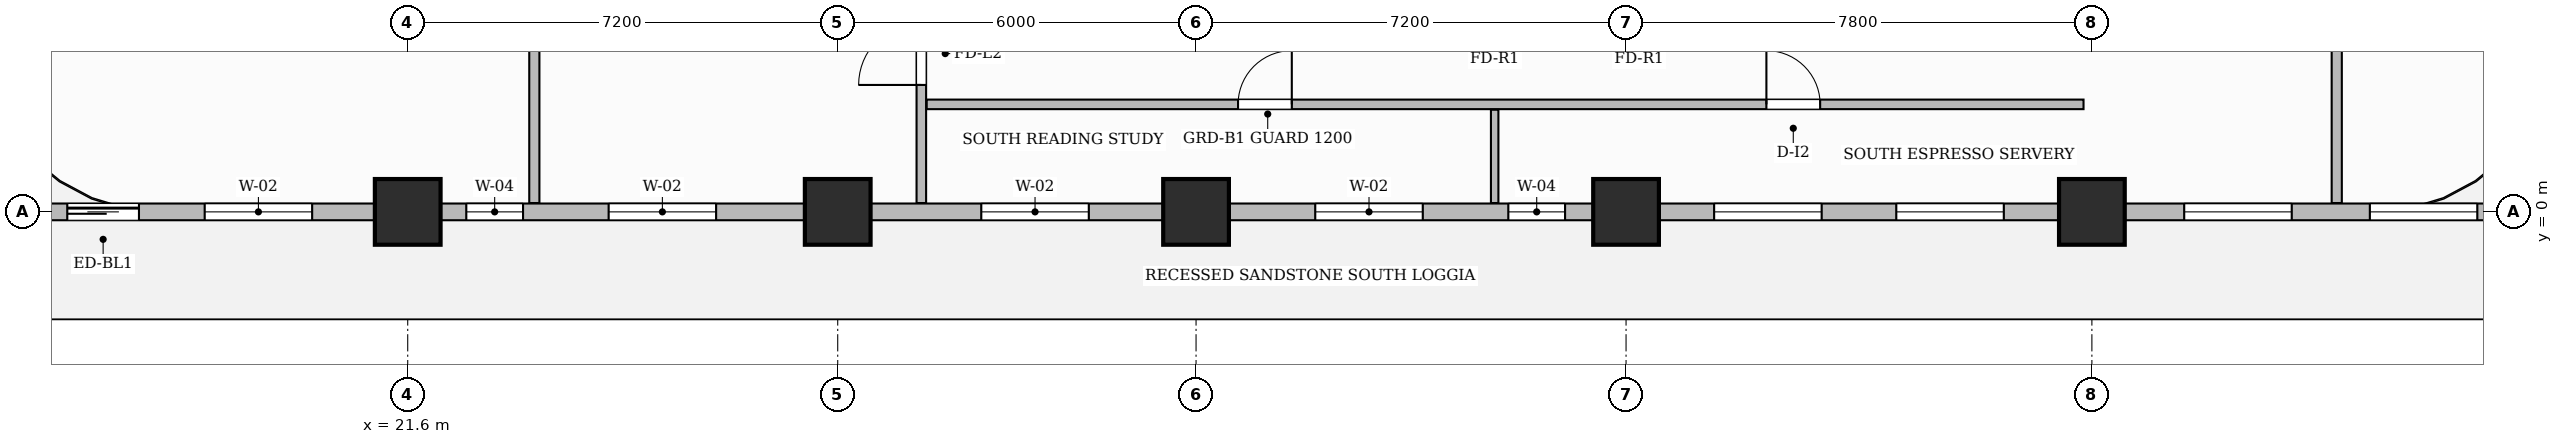
"""IFC4 building model, lengths in metres.
Left out: names, types, materials, properties, quantities, classifications, styles, units other than length and angle.
Written with IfcOpenShell. Run it as: python <this file> out.ifc"""

import sys

from ifc_helpers import new_model, si_unit, direction, frame, frame_2d, origin, origin_2d, place, context, subcontext, project, spatial, rectangle, extrude, source, transform, mapped, element, fill, save


model = new_model("IFC4")
c1 = context("Model", 3, precision=1e-05, world=origin(), true_north=direction((0.0, 1.0)))
c2 = subcontext(c1, "Body", "Model", "MODEL_VIEW")
j1 = project(units=[si_unit("LENGTHUNIT", "METRE"), si_unit("PLANEANGLEUNIT", "RADIAN")], contexts=[c1])
p1 = place(None, origin())
s1 = spatial("IfcSite", under=j1, at=p1, CompositionType="ELEMENT")
p2 = place(p1, origin())
s2 = spatial("IfcBuilding", under=s1, at=p2, CompositionType="ELEMENT")
p3 = place(p2, frame((0.0, 0.0, 43.5)))
s3 = spatial("IfcBuildingStorey", under=s2, at=p3, CompositionType="ELEMENT", Elevation=43.5)
m1 = source(origin(), c2, "Body", "SweptSolid", [
    extrude(rectangle(XDim=1.1, YDim=1.1, at=origin_2d()), origin(), (0.0, 0.0, 1.0), 3.7),
])
for number, where, z_axis, x_axis in (
    (1, (21.6, 0.0, 0.0), (0.0, 0.0, 1.0), (1.0, 0.0, 0.0)),
    (2, (28.8, 0.0, 0.0), (0.0, 0.0, 1.0), (1.0, 0.0, 0.0)),
    (3, (34.8, 0.0, 0.0), (0.0, 0.0, 1.0), (1.0, 0.0, 0.0)),
    (4, (42.0, 0.0, 0.0), (0.0, 0.0, 1.0), (1.0, 0.0, 0.0)),
    (5, (49.8, 0.0, 0.0), (0.0, 0.0, 1.0), (1.0, 0.0, 0.0)),
):
    element("IfcColumn", number, at=place(p3, frame(where, z_axis=z_axis, x_axis=x_axis)), inside=s3, PredefinedType="COLUMN", context=c2, shape_type="MappedRepresentation", body=[
        mapped(m1, transform((0.0, 0.0, 0.0), scale=1.0)),
    ])
p4 = place(p3, frame((30.2, 0.148, 0.0), z_axis=(0.0, 0.0, 1.0), x_axis=(0.0, 1.0, 0.0)))
e6 = element("IfcWall", 6, at=p4, inside=s3, PredefinedType="PARTITIONING", context=c2, shape_type="SweptSolid", body=[
    extrude(rectangle(XDim=9.512, YDim=0.16, at=frame_2d((4.756, 0.0))), origin(), (0.0, 0.0, 1.0), 3.45),
])
p5 = place(p4, frame((1.977, 0.0, 0.0)))
e7 = element("IfcOpeningElement", 7, at=p5, cuts=e6, PredefinedType="OPENING", context=c2, shape_type="SweptSolid", body=[
    extrude(rectangle(XDim=1.05, YDim=2.15, at=frame_2d((0.525, 1.075))), frame((0.0, 0.09, 0.0), z_axis=(0.0, -1.0, 0.0), x_axis=(1.0, 0.0, 0.0)), (0.0, 0.0, 1.0), 0.18),
])
p6 = place(p3, frame((30.29, 1.8, 0.0), z_axis=(0.0, 0.0, 1.0), x_axis=(1.0, 0.0, 0.0)))
e8 = element("IfcWall", 8, at=p6, inside=s3, PredefinedType="PARTITIONING", context=c2, shape_type="SweptSolid", body=[
    extrude(rectangle(XDim=19.37, YDim=0.16, at=frame_2d((9.685, 0.0))), origin(), (0.0, 0.0, 1.0), 3.45),
])
p7 = place(p6, frame((5.213, 0.0, 0.0)))
e9 = element("IfcOpeningElement", 9, at=p7, cuts=e8, PredefinedType="OPENING", context=c2, shape_type="SweptSolid", body=[
    extrude(rectangle(XDim=0.9, YDim=2.15, at=frame_2d((0.45, 1.075))), frame((0.0, 0.09, 0.0), z_axis=(0.0, -1.0, 0.0), x_axis=(1.0, 0.0, 0.0)), (0.0, 0.0, 1.0), 0.18),
])
p8 = place(p6, frame((14.06, 0.0, 0.0)))
e10 = element("IfcOpeningElement", 10, at=p8, cuts=e8, PredefinedType="OPENING", context=c2, shape_type="SweptSolid", body=[
    extrude(rectangle(XDim=0.9, YDim=2.15, at=frame_2d((0.45, 1.075))), frame((0.0, 0.09, 0.0), z_axis=(0.0, -1.0, 0.0), x_axis=(1.0, 0.0, 0.0)), (0.0, 0.0, 1.0), 0.18),
])
p9 = place(p3, frame((39.8, 0.148, 0.0), z_axis=(0.0, 0.0, 1.0), x_axis=(0.0, 1.0, 0.0)))
e11 = element("IfcWall", 11, at=p9, inside=s3, PredefinedType="PARTITIONING", context=c2, shape_type="SweptSolid", body=[
    extrude(rectangle(XDim=1.562, YDim=0.125, at=frame_2d((0.781, 0.0))), origin(), (0.0, 0.0, 1.0), 3.45),
])
p10 = place(p3, frame((53.9, 0.148, 0.0), z_axis=(0.0, 0.0, 1.0), x_axis=(0.0, 1.0, 0.0)))
e12 = element("IfcWall", 12, at=p10, inside=s3, PredefinedType="PARTITIONING", context=c2, shape_type="SweptSolid", body=[
    extrude(rectangle(XDim=14.162, YDim=0.17, at=frame_2d((7.081, 0.0))), origin(), (0.0, 0.0, 1.0), 3.035),
])
p11 = place(p3, frame((23.72, 0.148, 0.0), z_axis=(0.0, 0.0, 1.0), x_axis=(0.0, 1.0, 0.0)))
e13 = element("IfcWall", 13, at=p11, inside=s3, PredefinedType="PARTITIONING", context=c2, shape_type="SweptSolid", body=[
    extrude(rectangle(XDim=9.512, YDim=0.17, at=frame_2d((4.756, 0.0))), origin(), (0.0, 0.0, 1.0), 3.45),
])
p12 = place(p3, frame((14.4, 0.0, 0.0), z_axis=(0.0, 0.0, 1.0), x_axis=(1.0, 0.0, 0.0)))
e14 = element("IfcWall", 14, at=p12, inside=s3, PredefinedType="SOLIDWALL", context=c2, shape_type="SweptSolid", body=[
    extrude(rectangle(XDim=43.2, YDim=0.28, at=frame_2d((21.6, 0.0))), origin(), (0.0, 0.0, 1.0), 2.885),
])
p13 = place(p12, frame((1.5, 0.0, 0.0)))
e15 = element("IfcOpeningElement", 15, at=p13, cuts=e14, PredefinedType="OPENING", context=c2, shape_type="SweptSolid", body=[
    extrude(rectangle(XDim=1.2, YDim=2.2, at=frame_2d((0.6, 1.1))), frame((0.0, 0.15, 0.0), z_axis=(0.0, -1.0, 0.0), x_axis=(1.0, 0.0, 0.0)), (0.0, 0.0, 1.0), 0.3),
])
p14 = place(p12, frame((3.8, 0.0, 0.8)))
e16 = element("IfcOpeningElement", 16, at=p14, cuts=e14, PredefinedType="OPENING", context=c2, shape_type="SweptSolid", body=[
    extrude(rectangle(XDim=1.8, YDim=1.85, at=frame_2d((0.9, 0.925))), frame((0.0, 0.15, 0.0), z_axis=(0.0, -1.0, 0.0), x_axis=(1.0, 0.0, 0.0)), (0.0, 0.0, 1.0), 0.3),
])
p15 = place(p12, frame((8.181, 0.0, 0.8)))
e17 = element("IfcOpeningElement", 17, at=p15, cuts=e14, PredefinedType="OPENING", context=c2, shape_type="SweptSolid", body=[
    extrude(rectangle(XDim=0.95, YDim=1.75, at=frame_2d((0.475, 0.875))), frame((0.0, 0.15, 0.0), z_axis=(0.0, -1.0, 0.0), x_axis=(1.0, 0.0, 0.0)), (0.0, 0.0, 1.0), 0.3),
])
p16 = place(p12, frame((10.564, 0.0, 0.8)))
e18 = element("IfcOpeningElement", 18, at=p16, cuts=e14, PredefinedType="OPENING", context=c2, shape_type="SweptSolid", body=[
    extrude(rectangle(XDim=1.8, YDim=1.85, at=frame_2d((0.9, 0.925))), frame((0.0, 0.15, 0.0), z_axis=(0.0, -1.0, 0.0), x_axis=(1.0, 0.0, 0.0)), (0.0, 0.0, 1.0), 0.3),
])
p17 = place(p12, frame((16.804, 0.0, 0.8)))
e19 = element("IfcOpeningElement", 19, at=p17, cuts=e14, PredefinedType="OPENING", context=c2, shape_type="SweptSolid", body=[
    extrude(rectangle(XDim=1.8, YDim=1.85, at=frame_2d((0.9, 0.925))), frame((0.0, 0.15, 0.0), z_axis=(0.0, -1.0, 0.0), x_axis=(1.0, 0.0, 0.0)), (0.0, 0.0, 1.0), 0.3),
])
p18 = place(p12, frame((22.396, 0.0, 0.8)))
e20 = element("IfcOpeningElement", 20, at=p18, cuts=e14, PredefinedType="OPENING", context=c2, shape_type="SweptSolid", body=[
    extrude(rectangle(XDim=1.8, YDim=1.85, at=frame_2d((0.9, 0.925))), frame((0.0, 0.15, 0.0), z_axis=(0.0, -1.0, 0.0), x_axis=(1.0, 0.0, 0.0)), (0.0, 0.0, 1.0), 0.3),
])
p19 = place(p12, frame((25.629, 0.0, 0.8)))
e21 = element("IfcOpeningElement", 21, at=p19, cuts=e14, PredefinedType="OPENING", context=c2, shape_type="SweptSolid", body=[
    extrude(rectangle(XDim=0.95, YDim=1.75, at=frame_2d((0.475, 0.875))), frame((0.0, 0.15, 0.0), z_axis=(0.0, -1.0, 0.0), x_axis=(1.0, 0.0, 0.0)), (0.0, 0.0, 1.0), 0.3),
])
p20 = place(p12, frame((29.075, 0.0, 0.8)))
e22 = element("IfcOpeningElement", 22, at=p20, cuts=e14, PredefinedType="OPENING", context=c2, shape_type="SweptSolid", body=[
    extrude(rectangle(XDim=1.8, YDim=1.85, at=frame_2d((0.9, 0.925))), frame((0.0, 0.15, 0.0), z_axis=(0.0, -1.0, 0.0), x_axis=(1.0, 0.0, 0.0)), (0.0, 0.0, 1.0), 0.3),
])
p21 = place(p12, frame((32.125, 0.0, 0.8)))
e23 = element("IfcOpeningElement", 23, at=p21, cuts=e14, PredefinedType="OPENING", context=c2, shape_type="SweptSolid", body=[
    extrude(rectangle(XDim=1.8, YDim=1.85, at=frame_2d((0.9, 0.925))), frame((0.0, 0.15, 0.0), z_axis=(0.0, -1.0, 0.0), x_axis=(1.0, 0.0, 0.0)), (0.0, 0.0, 1.0), 0.3),
])
p22 = place(p12, frame((36.946, 0.0, 0.8)))
e24 = element("IfcOpeningElement", 24, at=p22, cuts=e14, PredefinedType="OPENING", context=c2, shape_type="SweptSolid", body=[
    extrude(rectangle(XDim=1.8, YDim=1.85, at=frame_2d((0.9, 0.925))), frame((0.0, 0.15, 0.0), z_axis=(0.0, -1.0, 0.0), x_axis=(1.0, 0.0, 0.0)), (0.0, 0.0, 1.0), 0.3),
])
p23 = place(p12, frame((40.054, 0.0, 0.8)))
e25 = element("IfcOpeningElement", 25, at=p23, cuts=e14, PredefinedType="OPENING", context=c2, shape_type="SweptSolid", body=[
    extrude(rectangle(XDim=1.8, YDim=1.85, at=frame_2d((0.9, 0.925))), frame((0.0, 0.15, 0.0), z_axis=(0.0, -1.0, 0.0), x_axis=(1.0, 0.0, 0.0)), (0.0, 0.0, 1.0), 0.3),
])
m2 = source(origin(), c2, "Body", "SweptSolid", [
    extrude(rectangle(XDim=1.05, YDim=2.15, at=frame_2d((0.525, 1.075))), frame((0.0, 0.025, 0.0), z_axis=(0.0, -1.0, 0.0), x_axis=(1.0, 0.0, 0.0)), (0.0, 0.0, 1.0), 0.05),
])
p24 = place(p5, origin())
e26 = element("IfcDoor", 26, at=p24, inside=s3, OperationType="SINGLE_SWING_LEFT", PredefinedType="DOOR", context=c2, shape_type="MappedRepresentation", body=[
    mapped(m2, transform((0.0, 0.0, 0.0), scale=1.0)),
])
fill(e7, e26)
m3 = source(origin(), c2, "Body", "SweptSolid", [
    extrude(rectangle(XDim=0.9, YDim=2.15, at=frame_2d((0.45, 1.075))), frame((0.0, 0.025, 0.0), z_axis=(0.0, -1.0, 0.0), x_axis=(1.0, 0.0, 0.0)), (0.0, 0.0, 1.0), 0.05),
])
p25 = place(p7, origin())
e27 = element("IfcDoor", 27, at=p25, inside=s3, OperationType="SINGLE_SWING_RIGHT", PredefinedType="DOOR", context=c2, shape_type="MappedRepresentation", body=[
    mapped(m3, transform((0.0, 0.0, 0.0), scale=1.0)),
])
fill(e9, e27)
p26 = place(p8, origin())
e28 = element("IfcDoor", 28, at=p26, inside=s3, OperationType="SINGLE_SWING_LEFT", PredefinedType="DOOR", context=c2, shape_type="MappedRepresentation", body=[
    mapped(m3, transform((0.0, 0.0, 0.0), scale=1.0)),
])
fill(e10, e28)
m4 = source(origin(), c2, "Body", "SweptSolid", [
    extrude(rectangle(XDim=1.2, YDim=2.2, at=frame_2d((0.6, 1.1))), frame((0.0, 0.025, 0.0), z_axis=(0.0, -1.0, 0.0), x_axis=(1.0, 0.0, 0.0)), (0.0, 0.0, 1.0), 0.05),
])
p27 = place(p13, origin())
e29 = element("IfcDoor", 29, at=p27, inside=s3, OperationType="SLIDING_TO_LEFT", PredefinedType="DOOR", context=c2, shape_type="MappedRepresentation", body=[
    mapped(m4, transform((0.0, 0.0, 0.0), scale=1.0)),
])
fill(e15, e29)
m5 = source(origin(), c2, "Body", "SweptSolid", [
    extrude(rectangle(XDim=1.8, YDim=1.85, at=frame_2d((0.9, 0.925))), frame((0.0, 0.03, 0.0), z_axis=(0.0, -1.0, 0.0), x_axis=(1.0, 0.0, 0.0)), (0.0, 0.0, 1.0), 0.06),
])
p28 = place(p14, origin())
e30 = element("IfcWindow", 30, at=p28, inside=s3, PartitioningType="DOUBLE_PANEL_VERTICAL", PredefinedType="WINDOW", context=c2, shape_type="MappedRepresentation", body=[
    mapped(m5, transform((0.0, 0.0, 0.0), scale=1.0)),
])
fill(e16, e30)
m6 = source(origin(), c2, "Body", "SweptSolid", [
    extrude(rectangle(XDim=0.95, YDim=1.75, at=frame_2d((0.475, 0.875))), frame((0.0, 0.03, 0.0), z_axis=(0.0, -1.0, 0.0), x_axis=(1.0, 0.0, 0.0)), (0.0, 0.0, 1.0), 0.06),
])
p29 = place(p15, origin())
e31 = element("IfcWindow", 31, at=p29, inside=s3, PartitioningType="SINGLE_PANEL", PredefinedType="WINDOW", context=c2, shape_type="MappedRepresentation", body=[
    mapped(m6, transform((0.0, 0.0, 0.0), scale=1.0)),
])
fill(e17, e31)
p30 = place(p16, origin())
e32 = element("IfcWindow", 32, at=p30, inside=s3, PartitioningType="DOUBLE_PANEL_VERTICAL", PredefinedType="WINDOW", context=c2, shape_type="MappedRepresentation", body=[
    mapped(m5, transform((0.0, 0.0, 0.0), scale=1.0)),
])
fill(e18, e32)
p31 = place(p17, origin())
e33 = element("IfcWindow", 33, at=p31, inside=s3, PartitioningType="DOUBLE_PANEL_VERTICAL", PredefinedType="WINDOW", context=c2, shape_type="MappedRepresentation", body=[
    mapped(m5, transform((0.0, 0.0, 0.0), scale=1.0)),
])
fill(e19, e33)
p32 = place(p18, origin())
e34 = element("IfcWindow", 34, at=p32, inside=s3, PartitioningType="DOUBLE_PANEL_VERTICAL", PredefinedType="WINDOW", context=c2, shape_type="MappedRepresentation", body=[
    mapped(m5, transform((0.0, 0.0, 0.0), scale=1.0)),
])
fill(e20, e34)
p33 = place(p19, origin())
e35 = element("IfcWindow", 35, at=p33, inside=s3, PartitioningType="SINGLE_PANEL", PredefinedType="WINDOW", context=c2, shape_type="MappedRepresentation", body=[
    mapped(m6, transform((0.0, 0.0, 0.0), scale=1.0)),
])
fill(e21, e35)
p34 = place(p20, origin())
e36 = element("IfcWindow", 36, at=p34, inside=s3, PartitioningType="DOUBLE_PANEL_VERTICAL", PredefinedType="WINDOW", context=c2, shape_type="MappedRepresentation", body=[
    mapped(m5, transform((0.0, 0.0, 0.0), scale=1.0)),
])
fill(e22, e36)
p35 = place(p21, origin())
e37 = element("IfcWindow", 37, at=p35, inside=s3, PartitioningType="DOUBLE_PANEL_VERTICAL", PredefinedType="WINDOW", context=c2, shape_type="MappedRepresentation", body=[
    mapped(m5, transform((0.0, 0.0, 0.0), scale=1.0)),
])
fill(e23, e37)
p36 = place(p22, origin())
e38 = element("IfcWindow", 38, at=p36, inside=s3, PartitioningType="DOUBLE_PANEL_VERTICAL", PredefinedType="WINDOW", context=c2, shape_type="MappedRepresentation", body=[
    mapped(m5, transform((0.0, 0.0, 0.0), scale=1.0)),
])
fill(e24, e38)
p37 = place(p23, origin())
e39 = element("IfcWindow", 39, at=p37, inside=s3, PartitioningType="DOUBLE_PANEL_VERTICAL", PredefinedType="WINDOW", context=c2, shape_type="MappedRepresentation", body=[
    mapped(m5, transform((0.0, 0.0, 0.0), scale=1.0)),
])
fill(e25, e39)
save(model, sys.argv[1])
